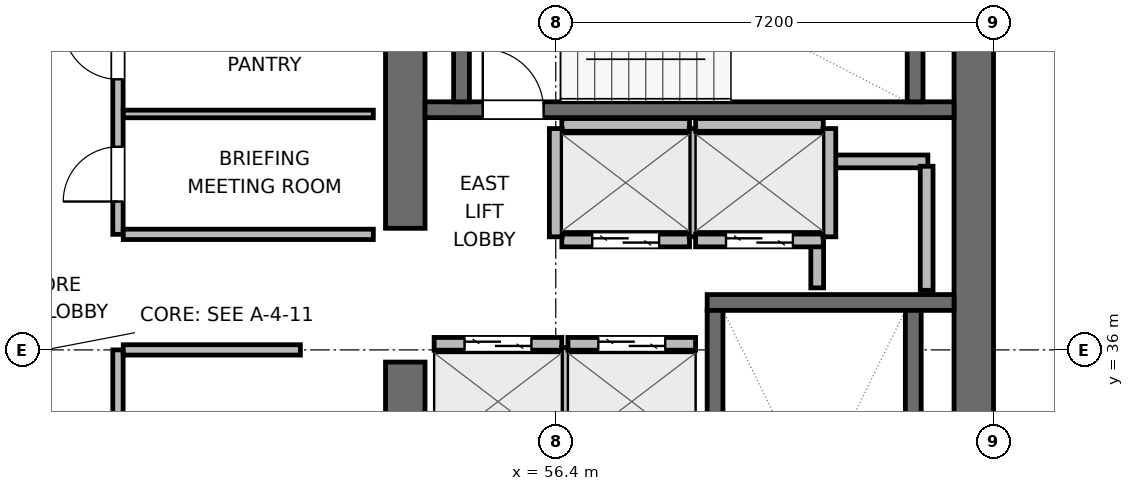
"""IFC4 building model, lengths in metres.
Left out: names, types, materials, properties, quantities, classifications, styles, units other than length and angle.
Written with IfcOpenShell. Run it as: python <this file> out.ifc"""

import sys

from ifc_helpers import new_model, si_unit, direction, frame, frame_2d, origin, place, context, subcontext, project, spatial, rectangle, extrude, element, fill, save


model = new_model("IFC4")
c1 = context("Model", 3, precision=1e-05, world=origin(), true_north=direction((0.0, 1.0)))
c2 = subcontext(c1, "Body", "Model", "MODEL_VIEW")
j1 = project(units=[si_unit("LENGTHUNIT", "METRE"), si_unit("PLANEANGLEUNIT", "RADIAN")], contexts=[c1])
p1 = place(None, origin())
s1 = spatial("IfcSite", under=j1, at=p1, CompositionType="ELEMENT")
p2 = place(p1, origin())
s2 = spatial("IfcBuilding", under=s1, at=p2, CompositionType="ELEMENT")
p3 = place(p2, frame((0.0, 0.0, 251.1)))
s3 = spatial("IfcBuildingStorey", under=s2, at=p3, CompositionType="ELEMENT", Elevation=251.1)
p4 = place(p3, frame((53.925, 27.925, 0.0), z_axis=(0.0, 0.0, 1.0), x_axis=(0.0, 1.0, 0.0)))
e1 = element("IfcWall", 1, at=p4, inside=s3, PredefinedType="SHEAR", context=c2, shape_type="SweptSolid", body=[
    extrude(rectangle(XDim=7.875, YDim=0.65, at=frame_2d((3.938, 0.0))), origin(), (0.0, 0.0, 1.0), 3.9),
])
p5 = place(p3, frame((53.925, 38.0, 0.0), z_axis=(0.0, 0.0, 1.0), x_axis=(0.0, 1.0, 0.0)))
e2 = element("IfcWall", 2, at=p5, inside=s3, PredefinedType="SHEAR", context=c2, shape_type="SweptSolid", body=[
    extrude(rectangle(XDim=6.075, YDim=0.65, at=frame_2d((3.038, 0.0))), origin(), (0.0, 0.0, 1.0), 3.9),
])
p6 = place(p3, frame((63.275, 27.6, 0.0), z_axis=(0.0, 0.0, 1.0), x_axis=(0.0, 1.0, 0.0)))
e3 = element("IfcWall", 3, at=p6, inside=s3, PredefinedType="SHEAR", context=c2, shape_type="SweptSolid", body=[
    extrude(rectangle(XDim=16.8, YDim=0.65, at=frame_2d((8.4, 0.0))), origin(), (0.0, 0.0, 1.0), 3.9),
])
p7 = place(p3, frame((58.89, 36.78, 0.0), z_axis=(0.0, 0.0, 1.0), x_axis=(1.0, 0.0, 0.0)))
e4 = element("IfcWall", 4, at=p7, inside=s3, PredefinedType="SHEAR", context=c2, shape_type="SweptSolid", body=[
    extrude(rectangle(XDim=4.06, YDim=0.26, at=frame_2d((2.03, 0.0))), origin(), (0.0, 0.0, 1.0), 3.9),
])
p8 = place(p3, frame((59.02, 29.05, 0.0), z_axis=(0.0, 0.0, 1.0), x_axis=(0.0, 1.0, 0.0)))
e5 = element("IfcWall", 5, at=p8, inside=s3, PredefinedType="SHEAR", context=c2, shape_type="SweptSolid", body=[
    extrude(rectangle(XDim=7.6, YDim=0.26, at=frame_2d((3.8, 0.0))), origin(), (0.0, 0.0, 1.0), 3.9),
])
p9 = place(p8, frame((0.3, 0.0, 0.0)))
e6 = element("IfcOpeningElement", 6, at=p9, cuts=e5, PredefinedType="OPENING", context=c2, shape_type="SweptSolid", body=[
    extrude(rectangle(XDim=1.0, YDim=2.04, at=frame_2d((0.5, 1.02))), frame((0.0, 0.14, 0.0), z_axis=(0.0, -1.0, 0.0), x_axis=(1.0, 0.0, 0.0)), (0.0, 0.0, 1.0), 0.28),
])
p10 = place(p3, frame((62.28, 29.05, 0.0), z_axis=(0.0, 0.0, 1.0), x_axis=(0.0, 1.0, 0.0)))
e7 = element("IfcWall", 7, at=p10, inside=s3, PredefinedType="SHEAR", context=c2, shape_type="SweptSolid", body=[
    extrude(rectangle(XDim=7.6, YDim=0.26, at=frame_2d((3.8, 0.0))), origin(), (0.0, 0.0, 1.0), 3.9),
])
p11 = place(p3, frame((54.25, 39.95, 0.0), z_axis=(0.0, 0.0, 1.0), x_axis=(1.0, 0.0, 0.0)))
e8 = element("IfcWall", 8, at=p11, inside=s3, PredefinedType="SHEAR", context=c2, shape_type="SweptSolid", body=[
    extrude(rectangle(XDim=8.7, YDim=0.26, at=frame_2d((4.35, 0.0))), origin(), (0.0, 0.0, 1.0), 3.9),
])
p12 = place(p11, frame((0.95, 0.0, 0.0)))
e9 = element("IfcOpeningElement", 9, at=p12, cuts=e8, PredefinedType="OPENING", context=c2, shape_type="SweptSolid", body=[
    extrude(rectangle(XDim=1.0, YDim=2.04, at=frame_2d((0.5, 1.02))), frame((0.0, 0.14, 0.0), z_axis=(0.0, -1.0, 0.0), x_axis=(1.0, 0.0, 0.0)), (0.0, 0.0, 1.0), 0.28),
])
for number, where, z_axis, x_axis in (
    (10, (54.85, 40.08, 0.0), (0.0, 0.0, 1.0), (0.0, 1.0, 0.0)),
    (11, (62.31, 40.08, 0.0), (0.0, 0.0, 1.0), (0.0, 1.0, 0.0)),
):
    element("IfcWall", number, at=place(p3, frame(where, z_axis=z_axis, x_axis=x_axis)), inside=s3, PredefinedType="SHEAR", context=c2, shape_type="SweptSolid", body=[
        extrude(rectangle(XDim=2.94, YDim=0.26, at=frame_2d((1.47, 0.0))), origin(), (0.0, 0.0, 1.0), 3.9),
    ])
p13 = place(p3, frame((60.72, 39.1, 0.0), z_axis=(0.0, 0.0, 1.0), x_axis=(1.0, 0.0, 0.0)))
e12 = element("IfcWall", 12, at=p13, inside=s3, PredefinedType="PARTITIONING", context=c2, shape_type="SweptSolid", body=[
    extrude(rectangle(XDim=1.8, YDim=0.21, at=frame_2d((0.9, 0.0))), origin(), (0.0, 0.0, 1.0), 3.68),
])
p14 = place(p3, frame((60.7, 37.02, 0.0), z_axis=(0.0, 0.0, 1.0), x_axis=(0.0, 1.0, 0.0)))
e13 = element("IfcWall", 13, at=p14, inside=s3, PredefinedType="PARTITIONING", context=c2, shape_type="SweptSolid", body=[
    extrude(rectangle(XDim=1.96, YDim=0.21, at=frame_2d((0.98, 0.0))), origin(), (0.0, 0.0, 1.0), 3.68),
])
p15 = place(p3, frame((62.5, 36.98, 0.0), z_axis=(0.0, 0.0, 1.0), x_axis=(0.0, 1.0, 0.0)))
e14 = element("IfcWall", 14, at=p15, inside=s3, PredefinedType="PARTITIONING", context=c2, shape_type="SweptSolid", body=[
    extrude(rectangle(XDim=2.04, YDim=0.21, at=frame_2d((1.02, 0.0))), origin(), (0.0, 0.0, 1.0), 3.68),
])
p16 = place(p3, frame((54.4, 36.1, 0.0), z_axis=(0.0, 0.0, 1.0), x_axis=(1.0, 0.0, 0.0)))
e15 = element("IfcWall", 15, at=p16, inside=s3, PredefinedType="PARTITIONING", context=c2, shape_type="SweptSolid", body=[
    extrude(rectangle(XDim=2.1, YDim=0.21, at=frame_2d((1.05, 0.0))), origin(), (0.0, 0.0, 1.0), 3.68),
])
p17 = place(p16, frame((0.5, 0.0, 0.0)))
e16 = element("IfcOpeningElement", 16, at=p17, cuts=e15, PredefinedType="OPENING", context=c2, shape_type="SweptSolid", body=[
    extrude(rectangle(XDim=1.1, YDim=2.04, at=frame_2d((0.55, 1.02))), frame((0.0, 0.115, 0.0), z_axis=(0.0, -1.0, 0.0), x_axis=(1.0, 0.0, 0.0)), (0.0, 0.0, 1.0), 0.23),
])
p18 = place(p3, frame((56.6, 34.26, 0.0), z_axis=(0.0, 0.0, 1.0), x_axis=(0.0, 1.0, 0.0)))
e17 = element("IfcWall", 17, at=p18, inside=s3, PredefinedType="PARTITIONING", context=c2, shape_type="SweptSolid", body=[
    extrude(rectangle(XDim=1.78, YDim=0.21, at=frame_2d((0.89, 0.0))), origin(), (0.0, 0.0, 1.0), 3.68),
])
p19 = place(p3, frame((56.6, 36.1, 0.0), z_axis=(0.0, 0.0, 1.0), x_axis=(1.0, 0.0, 0.0)))
e18 = element("IfcWall", 18, at=p19, inside=s3, PredefinedType="PARTITIONING", context=c2, shape_type="SweptSolid", body=[
    extrude(rectangle(XDim=2.1, YDim=0.21, at=frame_2d((1.05, 0.0))), origin(), (0.0, 0.0, 1.0), 3.68),
])
p20 = place(p19, frame((0.5, 0.0, 0.0)))
e19 = element("IfcOpeningElement", 19, at=p20, cuts=e18, PredefinedType="OPENING", context=c2, shape_type="SweptSolid", body=[
    extrude(rectangle(XDim=1.1, YDim=2.04, at=frame_2d((0.55, 1.02))), frame((0.0, 0.115, 0.0), z_axis=(0.0, -1.0, 0.0), x_axis=(1.0, 0.0, 0.0)), (0.0, 0.0, 1.0), 0.23),
])
p21 = place(p3, frame((56.5, 37.8, 0.0), z_axis=(0.0, 0.0, 1.0), x_axis=(1.0, 0.0, 0.0)))
e20 = element("IfcWall", 20, at=p21, inside=s3, PredefinedType="PARTITIONING", context=c2, shape_type="SweptSolid", body=[
    extrude(rectangle(XDim=2.1, YDim=0.21, at=frame_2d((1.05, 0.0))), origin(), (0.0, 0.0, 1.0), 3.68),
])
p22 = place(p21, frame((0.5, 0.0, 0.0)))
e21 = element("IfcOpeningElement", 21, at=p22, cuts=e20, PredefinedType="OPENING", context=c2, shape_type="SweptSolid", body=[
    extrude(rectangle(XDim=1.1, YDim=2.04, at=frame_2d((0.55, 1.02))), frame((0.0, 0.115, 0.0), z_axis=(0.0, -1.0, 0.0), x_axis=(1.0, 0.0, 0.0)), (0.0, 0.0, 1.0), 0.23),
])
p23 = place(p3, frame((56.5, 39.7, 0.0), z_axis=(0.0, 0.0, 1.0), x_axis=(1.0, 0.0, 0.0)))
e22 = element("IfcWall", 22, at=p23, inside=s3, PredefinedType="PARTITIONING", context=c2, shape_type="SweptSolid", body=[
    extrude(rectangle(XDim=2.1, YDim=0.21, at=frame_2d((1.05, 0.0))), origin(), (0.0, 0.0, 1.0), 3.68),
])
for number, where, z_axis, x_axis in (
    (23, (56.4, 37.86, 0.0), (0.0, 0.0, 1.0), (0.0, 1.0, 0.0)),
    (24, (58.7, 37.86, 0.0), (0.0, 0.0, 1.0), (0.0, 1.0, 0.0)),
):
    element("IfcWall", number, at=place(p3, frame(where, z_axis=z_axis, x_axis=x_axis)), inside=s3, PredefinedType="PARTITIONING", context=c2, shape_type="SweptSolid", body=[
        extrude(rectangle(XDim=1.78, YDim=0.21, at=frame_2d((0.89, 0.0))), origin(), (0.0, 0.0, 1.0), 3.68),
    ])
p24 = place(p3, frame((58.7, 37.8, 0.0), z_axis=(0.0, 0.0, 1.0), x_axis=(1.0, 0.0, 0.0)))
e25 = element("IfcWall", 25, at=p24, inside=s3, PredefinedType="PARTITIONING", context=c2, shape_type="SweptSolid", body=[
    extrude(rectangle(XDim=2.1, YDim=0.21, at=frame_2d((1.05, 0.0))), origin(), (0.0, 0.0, 1.0), 3.68),
])
p25 = place(p24, frame((0.5, 0.0, 0.0)))
e26 = element("IfcOpeningElement", 26, at=p25, cuts=e25, PredefinedType="OPENING", context=c2, shape_type="SweptSolid", body=[
    extrude(rectangle(XDim=1.1, YDim=2.04, at=frame_2d((0.55, 1.02))), frame((0.0, 0.115, 0.0), z_axis=(0.0, -1.0, 0.0), x_axis=(1.0, 0.0, 0.0)), (0.0, 0.0, 1.0), 0.23),
])
p26 = place(p3, frame((58.7, 39.7, 0.0), z_axis=(0.0, 0.0, 1.0), x_axis=(1.0, 0.0, 0.0)))
e27 = element("IfcWall", 27, at=p26, inside=s3, PredefinedType="PARTITIONING", context=c2, shape_type="SweptSolid", body=[
    extrude(rectangle(XDim=2.1, YDim=0.21, at=frame_2d((1.05, 0.0))), origin(), (0.0, 0.0, 1.0), 3.68),
])
p27 = place(p3, frame((60.9, 37.86, 0.0), z_axis=(0.0, 0.0, 1.0), x_axis=(0.0, 1.0, 0.0)))
e28 = element("IfcWall", 28, at=p27, inside=s3, PredefinedType="PARTITIONING", context=c2, shape_type="SweptSolid", body=[
    extrude(rectangle(XDim=1.78, YDim=0.21, at=frame_2d((0.89, 0.0))), origin(), (0.0, 0.0, 1.0), 3.68),
])
p28 = place(p3, frame((49.2, 32.6, 0.0), z_axis=(0.0, 0.0, 1.0), x_axis=(0.0, 1.0, 0.0)))
e29 = element("IfcWall", 29, at=p28, inside=s3, PredefinedType="PARTITIONING", context=c2, shape_type="SweptSolid", body=[
    extrude(rectangle(XDim=3.4, YDim=0.17, at=frame_2d((1.7, 0.0))), origin(), (0.0, 0.0, 1.0), 3.68),
])
p29 = place(p28, frame((1.25, 0.0, 0.0)))
e30 = element("IfcOpeningElement", 30, at=p29, cuts=e29, PredefinedType="OPENING", context=c2, shape_type="SweptSolid", body=[
    extrude(rectangle(XDim=0.9, YDim=2.02, at=frame_2d((0.45, 1.01))), frame((0.0, 0.095, 0.0), z_axis=(0.0, -1.0, 0.0), x_axis=(1.0, 0.0, 0.0)), (0.0, 0.0, 1.0), 0.19),
])
p30 = place(p3, frame((49.287, 36.0, 0.0), z_axis=(0.0, 0.0, 1.0), x_axis=(1.0, 0.0, 0.0)))
e31 = element("IfcWall", 31, at=p30, inside=s3, PredefinedType="PARTITIONING", context=c2, shape_type="SweptSolid", body=[
    extrude(rectangle(XDim=2.913, YDim=0.17, at=frame_2d((1.457, 0.0))), origin(), (0.0, 0.0, 1.0), 3.68),
])
p31 = place(p3, frame((49.2, 37.9, 0.0), z_axis=(0.0, 0.0, 1.0), x_axis=(0.0, 1.0, 0.0)))
e32 = element("IfcWall", 32, at=p31, inside=s3, PredefinedType="PARTITIONING", context=c2, shape_type="SweptSolid", body=[
    extrude(rectangle(XDim=6.0, YDim=0.17, at=frame_2d((3.0, 0.0))), origin(), (0.0, 0.0, 1.0), 3.68),
])
p32 = place(p31, frame((0.54, 0.0, 0.0)))
e33 = element("IfcOpeningElement", 33, at=p32, cuts=e32, PredefinedType="OPENING", context=c2, shape_type="SweptSolid", body=[
    extrude(rectangle(XDim=0.9, YDim=2.02, at=frame_2d((0.45, 1.01))), frame((0.0, 0.095, 0.0), z_axis=(0.0, -1.0, 0.0), x_axis=(1.0, 0.0, 0.0)), (0.0, 0.0, 1.0), 0.19),
])
p33 = place(p31, frame((2.55, 0.0, 0.0)))
e34 = element("IfcOpeningElement", 34, at=p33, cuts=e32, PredefinedType="OPENING", context=c2, shape_type="SweptSolid", body=[
    extrude(rectangle(XDim=0.9, YDim=2.02, at=frame_2d((0.45, 1.01))), frame((0.0, 0.095, 0.0), z_axis=(0.0, -1.0, 0.0), x_axis=(1.0, 0.0, 0.0)), (0.0, 0.0, 1.0), 0.19),
])
p34 = place(p31, frame((4.56, 0.0, 0.0)))
e35 = element("IfcOpeningElement", 35, at=p34, cuts=e32, PredefinedType="OPENING", context=c2, shape_type="SweptSolid", body=[
    extrude(rectangle(XDim=0.9, YDim=2.02, at=frame_2d((0.45, 1.01))), frame((0.0, 0.095, 0.0), z_axis=(0.0, -1.0, 0.0), x_axis=(1.0, 0.0, 0.0)), (0.0, 0.0, 1.0), 0.19),
])
p35 = place(p3, frame((49.287, 37.9, 0.0), z_axis=(0.0, 0.0, 1.0), x_axis=(1.0, 0.0, 0.0)))
e36 = element("IfcWall", 36, at=p35, inside=s3, PredefinedType="PARTITIONING", context=c2, shape_type="SweptSolid", body=[
    extrude(rectangle(XDim=4.113, YDim=0.17, at=frame_2d((2.056, 0.0))), origin(), (0.0, 0.0, 1.0), 3.68),
])
p36 = place(p3, frame((49.287, 39.88, 0.0), z_axis=(0.0, 0.0, 1.0), x_axis=(1.0, 0.0, 0.0)))
e37 = element("IfcWall", 37, at=p36, inside=s3, PredefinedType="PARTITIONING", context=c2, shape_type="SweptSolid", body=[
    extrude(rectangle(XDim=4.113, YDim=0.125, at=frame_2d((2.056, 0.0))), origin(), (0.0, 0.0, 1.0), 3.68),
])
p37 = place(p12, origin())
e38 = element("IfcDoor", 38, at=p37, inside=s3, OperationType="SINGLE_SWING_LEFT", PredefinedType="DOOR", context=c2, shape_type="SweptSolid", body=[
    extrude(rectangle(XDim=1.0, YDim=2.04, at=frame_2d((0.5, 1.02))), frame((0.0, 0.025, 0.0), z_axis=(0.0, -1.0, 0.0), x_axis=(1.0, 0.0, 0.0)), (0.0, 0.0, 1.0), 0.05),
])
fill(e9, e38)
p38 = place(p17, origin())
e39 = element("IfcDoor", 39, at=p38, inside=s3, OperationType="DOUBLE_DOOR_SLIDING", PredefinedType="DOOR", context=c2, shape_type="SweptSolid", body=[
    extrude(rectangle(XDim=1.1, YDim=2.04, at=frame_2d((0.55, 1.02))), frame((0.0, 0.025, 0.0), z_axis=(0.0, -1.0, 0.0), x_axis=(1.0, 0.0, 0.0)), (0.0, 0.0, 1.0), 0.05),
])
fill(e16, e39)
p39 = place(p20, origin())
e40 = element("IfcDoor", 40, at=p39, inside=s3, OperationType="DOUBLE_DOOR_SLIDING", PredefinedType="DOOR", context=c2, shape_type="SweptSolid", body=[
    extrude(rectangle(XDim=1.1, YDim=2.04, at=frame_2d((0.55, 1.02))), frame((0.0, 0.025, 0.0), z_axis=(0.0, -1.0, 0.0), x_axis=(1.0, 0.0, 0.0)), (0.0, 0.0, 1.0), 0.05),
])
fill(e19, e40)
p40 = place(p22, origin())
e41 = element("IfcDoor", 41, at=p40, inside=s3, OperationType="DOUBLE_DOOR_SLIDING", PredefinedType="DOOR", context=c2, shape_type="SweptSolid", body=[
    extrude(rectangle(XDim=1.1, YDim=2.04, at=frame_2d((0.55, 1.02))), frame((0.0, 0.025, 0.0), z_axis=(0.0, -1.0, 0.0), x_axis=(1.0, 0.0, 0.0)), (0.0, 0.0, 1.0), 0.05),
])
fill(e21, e41)
p41 = place(p25, origin())
e42 = element("IfcDoor", 42, at=p41, inside=s3, OperationType="DOUBLE_DOOR_SLIDING", PredefinedType="DOOR", context=c2, shape_type="SweptSolid", body=[
    extrude(rectangle(XDim=1.1, YDim=2.04, at=frame_2d((0.55, 1.02))), frame((0.0, 0.025, 0.0), z_axis=(0.0, -1.0, 0.0), x_axis=(1.0, 0.0, 0.0)), (0.0, 0.0, 1.0), 0.05),
])
fill(e26, e42)
p42 = place(p32, origin())
e43 = element("IfcDoor", 43, at=p42, inside=s3, OperationType="SINGLE_SWING_LEFT", PredefinedType="DOOR", context=c2, shape_type="SweptSolid", body=[
    extrude(rectangle(XDim=0.9, YDim=2.02, at=frame_2d((0.45, 1.01))), frame((0.0, 0.025, 0.0), z_axis=(0.0, -1.0, 0.0), x_axis=(1.0, 0.0, 0.0)), (0.0, 0.0, 1.0), 0.05),
])
fill(e33, e43)
p43 = place(p33, origin())
e44 = element("IfcDoor", 44, at=p43, inside=s3, OperationType="SINGLE_SWING_RIGHT", PredefinedType="DOOR", context=c2, shape_type="SweptSolid", body=[
    extrude(rectangle(XDim=0.9, YDim=2.02, at=frame_2d((0.45, 1.01))), frame((0.0, 0.025, 0.0), z_axis=(0.0, -1.0, 0.0), x_axis=(1.0, 0.0, 0.0)), (0.0, 0.0, 1.0), 0.05),
])
fill(e34, e44)
save(model, sys.argv[1])
